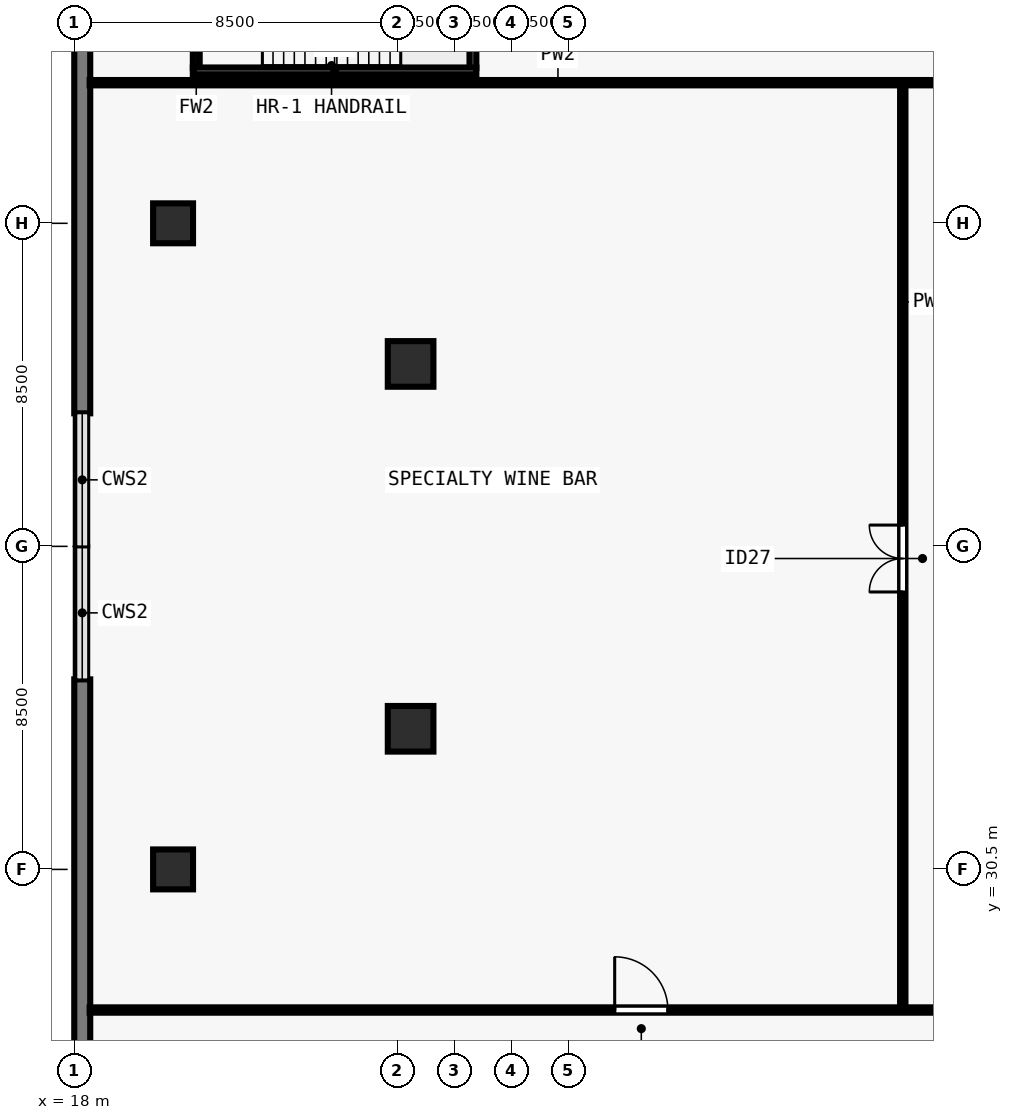
"""IFC4 building model, lengths in metres.
Left out: names, types, materials, properties, quantities, classifications, styles, units other than length and angle.
Written with IfcOpenShell. Run it as: python <this file> out.ifc"""

import sys

from ifc_helpers import new_model, si_unit, direction, frame, frame_2d, origin, origin_2d, place, context, subcontext, project, spatial, rectangle, extrude, element, fill, save


model = new_model("IFC4")
c1 = context("Model", 3, precision=1e-05, world=origin(), true_north=direction((0.0, 1.0)))
c2 = subcontext(c1, "Body", "Model", "MODEL_VIEW")
j1 = project(units=[si_unit("LENGTHUNIT", "METRE"), si_unit("PLANEANGLEUNIT", "RADIAN")], contexts=[c1])
p1 = place(None, origin())
s1 = spatial("IfcSite", under=j1, at=p1, CompositionType="ELEMENT")
p2 = place(p1, origin())
s2 = spatial("IfcBuilding", under=s1, at=p2, CompositionType="ELEMENT")
p3 = place(p2, frame((0.0, 0.0, 5.0)))
s3 = spatial("IfcBuildingStorey", under=s2, at=p3, CompositionType="ELEMENT", Elevation=5.0)
for number, where, z_axis, x_axis in (
    (1, (26.85, 43.8, 0.0), (0.0, 0.0, 1.0), (1.0, 0.0, 0.0)),
    (2, (26.85, 34.2, 0.0), (0.0, 0.0, 1.0), (1.0, 0.0, 0.0)),
):
    element("IfcColumn", number, at=place(p3, frame(where, z_axis=z_axis, x_axis=x_axis)), inside=s3, PredefinedType="COLUMN", context=c2, shape_type="SweptSolid", body=[
        extrude(rectangle(XDim=1.2, YDim=1.2, at=origin_2d()), origin(), (0.0, 0.0, 1.0), 5.0),
    ])
for number, where, z_axis, x_axis in (
    (3, (20.6, 30.5, 0.0), (0.0, 0.0, 1.0), (1.0, 0.0, 0.0)),
    (4, (20.6, 47.5, 0.0), (0.0, 0.0, 1.0), (1.0, 0.0, 0.0)),
):
    element("IfcColumn", number, at=place(p3, frame(where, z_axis=z_axis, x_axis=x_axis)), inside=s3, PredefinedType="COLUMN", context=c2, shape_type="SweptSolid", body=[
        extrude(rectangle(XDim=1.05, YDim=1.05, at=origin_2d()), origin(), (0.0, 0.0, 1.0), 5.0),
    ])
for number, where, z_axis, x_axis in (
    (5, (18.21, 12.405, 0.0), (0.0, 0.0, 1.0), (0.0, 1.0, 0.0)),
    (6, (18.21, 42.5, 0.0), (0.0, 0.0, 1.0), (0.0, 1.0, 0.0)),
):
    element("IfcWall", number, at=place(p3, frame(where, z_axis=z_axis, x_axis=x_axis)), inside=s3, PredefinedType="SOLIDWALL", context=c2, shape_type="SweptSolid", body=[
        extrude(rectangle(XDim=23.095, YDim=0.42, at=frame_2d((11.547, 0.0))), origin(), (0.0, 0.0, 1.0), 4.72),
    ])
p4 = place(p3, frame((18.405, 26.8, 0.0), z_axis=(0.0, 0.0, 1.0), x_axis=(1.0, 0.0, 0.0)))
e7 = element("IfcWall", 7, at=p4, inside=s3, PredefinedType="PARTITIONING", context=c2, shape_type="SweptSolid", body=[
    extrude(rectangle(XDim=67.19, YDim=0.14, at=frame_2d((33.595, 0.0))), origin(), (0.0, 0.0, 1.0), 4.238),
])
p5 = place(p4, frame((13.815, 0.0, 0.0)))
e8 = element("IfcOpeningElement", 8, at=p5, cuts=e7, PredefinedType="OPENING", context=c2, shape_type="SweptSolid", body=[
    extrude(rectangle(XDim=1.4, YDim=2.2, at=frame_2d((0.7, 1.1))), frame((0.0, 0.08, 0.0), z_axis=(0.0, -1.0, 0.0), x_axis=(1.0, 0.0, 0.0)), (0.0, 0.0, 1.0), 0.16),
])
p6 = place(p4, frame((41.815, 0.0, 0.0)))
e9 = element("IfcOpeningElement", 9, at=p6, cuts=e7, PredefinedType="OPENING", context=c2, shape_type="SweptSolid", body=[
    extrude(rectangle(XDim=1.4, YDim=2.2, at=frame_2d((0.7, 1.1))), frame((0.0, 0.08, 0.0), z_axis=(0.0, -1.0, 0.0), x_axis=(1.0, 0.0, 0.0)), (0.0, 0.0, 1.0), 0.16),
])
p7 = place(p3, frame((18.405, 51.2, 0.0), z_axis=(0.0, 0.0, 1.0), x_axis=(1.0, 0.0, 0.0)))
e10 = element("IfcWall", 10, at=p7, inside=s3, PredefinedType="PARTITIONING", context=c2, shape_type="SweptSolid", body=[
    extrude(rectangle(XDim=67.19, YDim=0.14, at=frame_2d((33.595, 0.0))), origin(), (0.0, 0.0, 1.0), 4.238),
])
p8 = place(p7, frame((24.795, 0.0, 0.0)))
e11 = element("IfcOpeningElement", 11, at=p8, cuts=e10, PredefinedType="OPENING", context=c2, shape_type="SweptSolid", body=[
    extrude(rectangle(XDim=1.76, YDim=2.2, at=frame_2d((0.88, 1.1))), frame((0.0, 0.08, 0.0), z_axis=(0.0, -1.0, 0.0), x_axis=(1.0, 0.0, 0.0)), (0.0, 0.0, 1.0), 0.16),
])
p9 = place(p7, frame((37.595, 0.0, 0.0)))
e12 = element("IfcOpeningElement", 12, at=p9, cuts=e10, PredefinedType="OPENING", context=c2, shape_type="SweptSolid", body=[
    extrude(rectangle(XDim=1.76, YDim=2.2, at=frame_2d((0.88, 1.1))), frame((0.0, 0.08, 0.0), z_axis=(0.0, -1.0, 0.0), x_axis=(1.0, 0.0, 0.0)), (0.0, 0.0, 1.0), 0.16),
])
p10 = place(p7, frame((51.595, 0.0, 0.0)))
e13 = element("IfcOpeningElement", 13, at=p10, cuts=e10, PredefinedType="OPENING", context=c2, shape_type="SweptSolid", body=[
    extrude(rectangle(XDim=0.95, YDim=2.1, at=frame_2d((0.475, 1.05))), frame((0.0, 0.08, 0.0), z_axis=(0.0, -1.0, 0.0), x_axis=(1.0, 0.0, 0.0)), (0.0, 0.0, 1.0), 0.16),
])
p11 = place(p7, frame((55.795, 0.0, 0.0)))
e14 = element("IfcOpeningElement", 14, at=p11, cuts=e10, PredefinedType="OPENING", context=c2, shape_type="SweptSolid", body=[
    extrude(rectangle(XDim=1.76, YDim=2.2, at=frame_2d((0.88, 1.1))), frame((0.0, 0.08, 0.0), z_axis=(0.0, -1.0, 0.0), x_axis=(1.0, 0.0, 0.0)), (0.0, 0.0, 1.0), 0.16),
])
p12 = place(p3, frame((39.8, 26.855, 0.0), z_axis=(0.0, 0.0, 1.0), x_axis=(0.0, 1.0, 0.0)))
e15 = element("IfcWall", 15, at=p12, inside=s3, PredefinedType="PARTITIONING", context=c2, shape_type="SweptSolid", body=[
    extrude(rectangle(XDim=24.29, YDim=0.14, at=frame_2d((12.145, 0.0))), origin(), (0.0, 0.0, 1.0), 4.72),
])
p13 = place(p12, frame((10.945, 0.0, 0.0)))
e16 = element("IfcOpeningElement", 16, at=p13, cuts=e15, PredefinedType="OPENING", context=c2, shape_type="SweptSolid", body=[
    extrude(rectangle(XDim=1.76, YDim=2.2, at=frame_2d((0.88, 1.1))), frame((0.0, 0.08, 0.0), z_axis=(0.0, -1.0, 0.0), x_axis=(1.0, 0.0, 0.0)), (0.0, 0.0, 1.0), 0.16),
])
p14 = place(p3, frame((21.21, 51.585, 0.0), z_axis=(0.0, 0.0, 1.0), x_axis=(0.0, 1.0, 0.0)))
e17 = element("IfcWall", 17, at=p14, inside=s3, PredefinedType="SOLIDWALL", context=c2, shape_type="SweptSolid", body=[
    extrude(rectangle(XDim=3.47, YDim=0.18, at=frame_2d((1.735, 0.0))), origin(), (0.0, 0.0, 1.0), 4.72),
])
p15 = place(p14, frame((1.26, 0.0, 0.0)))
e18 = element("IfcOpeningElement", 18, at=p15, cuts=e17, PredefinedType="OPENING", context=c2, shape_type="SweptSolid", body=[
    extrude(rectangle(XDim=0.95, YDim=2.15, at=frame_2d((0.475, 1.075))), frame((0.0, 0.1, 0.0), z_axis=(0.0, -1.0, 0.0), x_axis=(1.0, 0.0, 0.0)), (0.0, 0.0, 1.0), 0.2),
])
p16 = place(p3, frame((28.49, 51.585, 0.0), z_axis=(0.0, 0.0, 1.0), x_axis=(0.0, 1.0, 0.0)))
e19 = element("IfcWall", 19, at=p16, inside=s3, PredefinedType="SOLIDWALL", context=c2, shape_type="SweptSolid", body=[
    extrude(rectangle(XDim=3.47, YDim=0.18, at=frame_2d((1.735, 0.0))), origin(), (0.0, 0.0, 1.0), 4.72),
])
p17 = place(p3, frame((21.12, 51.51, 0.0), z_axis=(0.0, 0.0, 1.0), x_axis=(1.0, 0.0, 0.0)))
e20 = element("IfcWall", 20, at=p17, inside=s3, PredefinedType="SOLIDWALL", context=c2, shape_type="SweptSolid", body=[
    extrude(rectangle(XDim=7.46, YDim=0.18, at=frame_2d((3.73, 0.0))), origin(), (0.0, 0.0, 1.0), 4.72),
])
p18 = place(p5, origin())
e21 = element("IfcDoor", 21, at=p18, inside=s3, OperationType="SINGLE_SWING_LEFT", PredefinedType="DOOR", context=c2, shape_type="SweptSolid", body=[
    extrude(rectangle(XDim=1.4, YDim=2.2, at=frame_2d((0.7, 1.1))), frame((0.0, 0.025, 0.0), z_axis=(0.0, -1.0, 0.0), x_axis=(1.0, 0.0, 0.0)), (0.0, 0.0, 1.0), 0.05),
])
fill(e8, e21)
p19 = place(p13, origin())
e22 = element("IfcDoor", 22, at=p19, inside=s3, OperationType="DOUBLE_DOOR_SINGLE_SWING", PredefinedType="DOOR", context=c2, shape_type="SweptSolid", body=[
    extrude(rectangle(XDim=1.76, YDim=2.2, at=frame_2d((0.88, 1.1))), frame((0.0, 0.025, 0.0), z_axis=(0.0, -1.0, 0.0), x_axis=(1.0, 0.0, 0.0)), (0.0, 0.0, 1.0), 0.05),
])
fill(e16, e22)
save(model, sys.argv[1])
